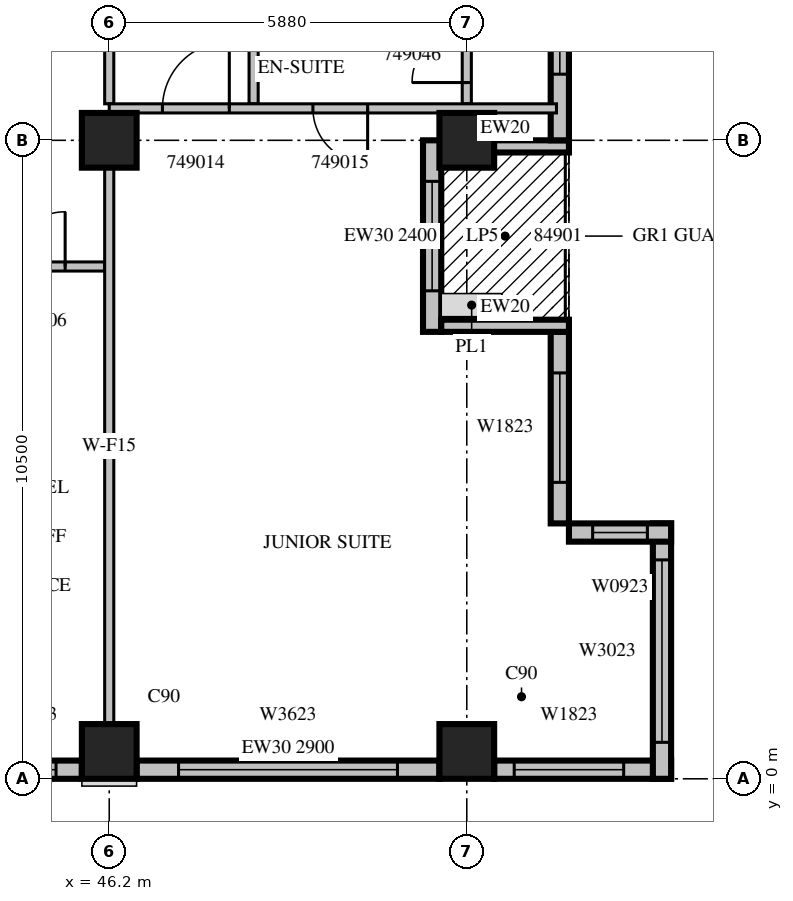
"""IFC4 building model, lengths in metres.
Left out: names, types, materials, properties, quantities, classifications, styles, units other than length and angle.
Written with IfcOpenShell. Run it as: python <this file> out.ifc"""

import sys

from ifc_helpers import new_model, si_unit, direction, frame, frame_2d, origin, origin_2d, place, context, subcontext, project, spatial, rectangle, extrude, source, transform, mapped, element, fill, save


model = new_model("IFC4")
c1 = context("Model", 3, precision=1e-05, world=origin(), true_north=direction((0.0, 1.0)))
c2 = subcontext(c1, "Body", "Model", "MODEL_VIEW")
j1 = project(units=[si_unit("LENGTHUNIT", "METRE"), si_unit("PLANEANGLEUNIT", "RADIAN")], contexts=[c1])
p1 = place(None, origin())
s1 = spatial("IfcSite", under=j1, at=p1, CompositionType="ELEMENT")
p2 = place(p1, origin())
s2 = spatial("IfcBuilding", under=s1, at=p2, CompositionType="ELEMENT")
p3 = place(p2, frame((0.0, 0.0, 219.6)))
s3 = spatial("IfcBuildingStorey", under=s2, at=p3, CompositionType="ELEMENT", Elevation=219.6)
m1 = source(origin(), c2, "Body", "SweptSolid", [
    extrude(rectangle(XDim=0.9, YDim=0.9, at=origin_2d()), origin(), (0.0, 0.0, 1.0), 3.8),
])
for number, where, z_axis, x_axis in (
    (1, (46.2, 0.45, 0.0), (0.0, 0.0, 1.0), (1.0, 0.0, 0.0)),
    (2, (52.08, 0.45, 0.0), (0.0, 0.0, 1.0), (1.0, 0.0, 0.0)),
    (3, (46.2, 10.5, 0.0), (0.0, 0.0, 1.0), (1.0, 0.0, 0.0)),
    (4, (52.08, 10.5, 0.0), (0.0, 0.0, 1.0), (1.0, 0.0, 0.0)),
):
    element("IfcColumn", number, at=place(p3, frame(where, z_axis=z_axis, x_axis=x_axis)), inside=s3, PredefinedType="COLUMN", context=c2, shape_type="MappedRepresentation", body=[
        mapped(m1, transform((0.0, 0.0, 0.0), scale=1.0)),
    ])
m2 = source(origin(), c2, "Body", "SweptSolid", [
    extrude(rectangle(XDim=1.75, YDim=0.3, at=frame_2d((0.875, 0.0))), origin(), (0.0, 0.0, 1.0), 3.4),
])
p4 = place(p3, frame((44.0, 0.15, 0.0), z_axis=(0.0, 0.0, 1.0), x_axis=(1.0, 0.0, 0.0)))
e5 = element("IfcWall", 5, at=p4, inside=s3, PredefinedType="STANDARD", context=c2, shape_type="MappedRepresentation", body=[
    mapped(m2, transform((0.0, 0.0, 0.0), scale=1.0)),
])
m3 = source(origin(), c2, "Body", "SweptSolid", [
    extrude(rectangle(XDim=0.9, YDim=2.3, at=frame_2d((0.45, 1.15))), frame((0.0, 0.16, 0.0), z_axis=(0.0, -1.0, 0.0), x_axis=(1.0, 0.0, 0.0)), (0.0, 0.0, 1.0), 0.32),
])
p5 = place(p4, frame((0.425, 0.0, 0.6)))
e6 = element("IfcOpeningElement", 6, at=p5, cuts=e5, PredefinedType="OPENING", context=c2, shape_type="MappedRepresentation", body=[
    mapped(m3, transform((0.0, 0.0, 0.0), scale=1.0)),
])
m4 = source(origin(), c2, "Body", "SweptSolid", [
    extrude(rectangle(XDim=4.98, YDim=0.3, at=frame_2d((2.49, 0.0))), origin(), (0.0, 0.0, 1.0), 2.9),
])
p6 = place(p3, frame((46.65, 0.15, 0.0), z_axis=(0.0, 0.0, 1.0), x_axis=(1.0, 0.0, 0.0)))
e7 = element("IfcWall", 7, at=p6, inside=s3, PredefinedType="STANDARD", context=c2, shape_type="MappedRepresentation", body=[
    mapped(m4, transform((0.0, 0.0, 0.0), scale=1.0)),
])
m5 = source(origin(), c2, "Body", "SweptSolid", [
    extrude(rectangle(XDim=3.6, YDim=2.3, at=frame_2d((1.8, 1.15))), frame((0.0, 0.16, 0.0), z_axis=(0.0, -1.0, 0.0), x_axis=(1.0, 0.0, 0.0)), (0.0, 0.0, 1.0), 0.32),
])
p7 = place(p6, frame((0.69, 0.0, 0.6)))
e8 = element("IfcOpeningElement", 8, at=p7, cuts=e7, PredefinedType="OPENING", context=c2, shape_type="MappedRepresentation", body=[
    mapped(m5, transform((0.0, 0.0, 0.0), scale=1.0)),
])
m6 = source(origin(), c2, "Body", "SweptSolid", [
    extrude(rectangle(XDim=2.91, YDim=0.3, at=frame_2d((1.455, 0.0))), origin(), (0.0, 0.0, 1.0), 3.4),
])
p8 = place(p3, frame((52.53, 0.15, 0.0), z_axis=(0.0, 0.0, 1.0), x_axis=(1.0, 0.0, 0.0)))
e9 = element("IfcWall", 9, at=p8, inside=s3, PredefinedType="STANDARD", context=c2, shape_type="MappedRepresentation", body=[
    mapped(m6, transform((0.0, 0.0, 0.0), scale=1.0)),
])
m7 = source(origin(), c2, "Body", "SweptSolid", [
    extrude(rectangle(XDim=1.8, YDim=2.3, at=frame_2d((0.9, 1.15))), frame((0.0, 0.16, 0.0), z_axis=(0.0, -1.0, 0.0), x_axis=(1.0, 0.0, 0.0)), (0.0, 0.0, 1.0), 0.32),
])
p9 = place(p8, frame((0.33, 0.0, 0.6)))
e10 = element("IfcOpeningElement", 10, at=p9, cuts=e9, PredefinedType="OPENING", context=c2, shape_type="MappedRepresentation", body=[
    mapped(m7, transform((0.0, 0.0, 0.0), scale=1.0)),
])
m8 = source(origin(), c2, "Body", "SweptSolid", [
    extrude(rectangle(XDim=4.2, YDim=0.3, at=frame_2d((2.1, 0.0))), origin(), (0.0, 0.0, 1.0), 3.4),
])
p10 = place(p3, frame((55.29, 0.0, 0.0), z_axis=(0.0, 0.0, 1.0), x_axis=(0.0, 1.0, 0.0)))
e11 = element("IfcWall", 11, at=p10, inside=s3, PredefinedType="STANDARD", context=c2, shape_type="MappedRepresentation", body=[
    mapped(m8, transform((0.0, 0.0, 0.0), scale=1.0)),
])
m9 = source(origin(), c2, "Body", "SweptSolid", [
    extrude(rectangle(XDim=3.0, YDim=2.3, at=frame_2d((1.5, 1.15))), frame((0.0, 0.16, 0.0), z_axis=(0.0, -1.0, 0.0), x_axis=(1.0, 0.0, 0.0)), (0.0, 0.0, 1.0), 0.32),
])
p11 = place(p10, frame((0.6, 0.0, 0.6)))
e12 = element("IfcOpeningElement", 12, at=p11, cuts=e11, PredefinedType="OPENING", context=c2, shape_type="MappedRepresentation", body=[
    mapped(m9, transform((0.0, 0.0, 0.0), scale=1.0)),
])
m10 = source(origin(), c2, "Body", "SweptSolid", [
    extrude(rectangle(XDim=1.68, YDim=0.3, at=frame_2d((0.84, 0.0))), origin(), (0.0, 0.0, 1.0), 3.4),
])
p12 = place(p3, frame((55.44, 4.05, 0.0), z_axis=(0.0, 0.0, 1.0), x_axis=(-1.0, 0.0, 0.0)))
e13 = element("IfcWall", 13, at=p12, inside=s3, PredefinedType="STANDARD", context=c2, shape_type="MappedRepresentation", body=[
    mapped(m10, transform((0.0, 0.0, 0.0), scale=1.0)),
])
p13 = place(p12, frame((0.39, 0.0, 0.6)))
e14 = element("IfcOpeningElement", 14, at=p13, cuts=e13, PredefinedType="OPENING", context=c2, shape_type="MappedRepresentation", body=[
    mapped(m3, transform((0.0, 0.0, 0.0), scale=1.0)),
])
m11 = source(origin(), c2, "Body", "SweptSolid", [
    extrude(rectangle(XDim=3.15, YDim=0.3, at=frame_2d((1.575, 0.0))), origin(), (0.0, 0.0, 1.0), 3.4),
])
p14 = place(p3, frame((53.61, 4.2, 0.0), z_axis=(0.0, 0.0, 1.0), x_axis=(0.0, 1.0, 0.0)))
e15 = element("IfcWall", 15, at=p14, inside=s3, PredefinedType="STANDARD", context=c2, shape_type="MappedRepresentation", body=[
    mapped(m11, transform((0.0, 0.0, 0.0), scale=1.0)),
])
p15 = place(p14, frame((0.675, 0.0, 0.6)))
e16 = element("IfcOpeningElement", 16, at=p15, cuts=e15, PredefinedType="OPENING", context=c2, shape_type="MappedRepresentation", body=[
    mapped(m7, transform((0.0, 0.0, 0.0), scale=1.0)),
])
p16 = place(p3, frame((51.51, 7.35, 0.0), z_axis=(0.0, 0.0, 1.0), x_axis=(0.0, 1.0, 0.0)))
e17 = element("IfcWall", 17, at=p16, inside=s3, PredefinedType="STANDARD", context=c2, shape_type="SweptSolid", body=[
    extrude(rectangle(XDim=3.15, YDim=0.3, at=frame_2d((1.575, 0.0))), origin(), (0.0, 0.0, 1.0), 2.4),
])
m12 = source(origin(), c2, "Body", "SweptSolid", [
    extrude(rectangle(XDim=1.8, YDim=2.4, at=frame_2d((0.9, 1.2))), frame((0.0, 0.16, 0.0), z_axis=(0.0, -1.0, 0.0), x_axis=(1.0, 0.0, 0.0)), (0.0, 0.0, 1.0), 0.32),
])
p17 = place(p16, frame((0.675, 0.0, 0.0)))
e18 = element("IfcOpeningElement", 18, at=p17, cuts=e17, PredefinedType="OPENING", context=c2, shape_type="MappedRepresentation", body=[
    mapped(m12, transform((0.0, 0.0, 0.0), scale=1.0)),
])
m13 = source(origin(), c2, "Body", "SweptSolid", [
    extrude(rectangle(XDim=2.1, YDim=0.2, at=frame_2d((1.05, 0.0))), origin(), (0.0, 0.0, 1.0), 3.4),
])
for number, where, z_axis, x_axis in (
    (19, (53.76, 7.45, 0.0), (0.0, 0.0, 1.0), (-1.0, 0.0, 0.0)),
    (20, (53.76, 10.4, 0.0), (0.0, 0.0, 1.0), (-1.0, 0.0, 0.0)),
):
    element("IfcWall", number, at=place(p3, frame(where, z_axis=z_axis, x_axis=x_axis)), inside=s3, PredefinedType="STANDARD", context=c2, shape_type="MappedRepresentation", body=[
        mapped(m13, transform((0.0, 0.0, 0.0), scale=1.0)),
    ])
m14 = source(origin(), c2, "Body", "SweptSolid", [
    extrude(rectangle(XDim=6.75, YDim=0.3, at=frame_2d((3.375, 0.0))), origin(), (0.0, 0.0, 1.0), 3.4),
])
p18 = place(p3, frame((53.61, 10.5, 0.0), z_axis=(0.0, 0.0, 1.0), x_axis=(0.0, 1.0, 0.0)))
e21 = element("IfcWall", 21, at=p18, inside=s3, PredefinedType="STANDARD", context=c2, shape_type="MappedRepresentation", body=[
    mapped(m14, transform((0.0, 0.0, 0.0), scale=1.0)),
])
m15 = source(origin(), c2, "Body", "SweptSolid", [
    extrude(rectangle(XDim=1.2, YDim=2.3, at=frame_2d((0.6, 1.15))), frame((0.0, 0.16, 0.0), z_axis=(0.0, -1.0, 0.0), x_axis=(1.0, 0.0, 0.0)), (0.0, 0.0, 1.0), 0.32),
])
p19 = place(p18, frame((1.087, 0.0, 0.6)))
e22 = element("IfcOpeningElement", 22, at=p19, cuts=e21, PredefinedType="OPENING", context=c2, shape_type="MappedRepresentation", body=[
    mapped(m15, transform((0.0, 0.0, 0.0), scale=1.0)),
])
p20 = place(p18, frame((4.606, 0.0, 0.6)))
e23 = element("IfcOpeningElement", 23, at=p20, cuts=e21, PredefinedType="OPENING", context=c2, shape_type="MappedRepresentation", body=[
    mapped(m15, transform((0.0, 0.0, 0.0), scale=1.0)),
])
m16 = source(origin(), c2, "Body", "SweptSolid", [
    extrude(rectangle(XDim=2.2, YDim=0.15, at=frame_2d((1.1, 0.0))), origin(), (0.0, 0.0, 1.0), 3.4),
])
p21 = place(p3, frame((46.125, 8.425, 0.0), z_axis=(0.0, 0.0, 1.0), x_axis=(-1.0, 0.0, 0.0)))
e24 = element("IfcWall", 24, at=p21, inside=s3, PredefinedType="PARTITIONING", context=c2, shape_type="MappedRepresentation", body=[
    mapped(m16, transform((0.0, 0.0, 0.0), scale=1.0)),
])
m17 = source(origin(), c2, "Body", "SweptSolid", [
    extrude(rectangle(XDim=0.9, YDim=2.1, at=frame_2d((0.45, 1.05))), frame((0.0, 0.085, 0.0), z_axis=(0.0, -1.0, 0.0), x_axis=(1.0, 0.0, 0.0)), (0.0, 0.0, 1.0), 0.17),
])
p22 = place(p21, frame((0.65, 0.0, 0.0)))
e25 = element("IfcOpeningElement", 25, at=p22, cuts=e24, PredefinedType="OPENING", context=c2, shape_type="MappedRepresentation", body=[
    mapped(m17, transform((0.0, 0.0, 0.0), scale=1.0)),
])
m18 = source(origin(), c2, "Body", "SweptSolid", [
    extrude(rectangle(XDim=3.6, YDim=0.15, at=frame_2d((1.8, 0.0))), origin(), (0.0, 0.0, 1.0), 3.4),
])
p23 = place(p3, frame((48.574, 11.1, 0.0), z_axis=(0.0, 0.0, 1.0), x_axis=(0.0, 1.0, 0.0)))
e26 = element("IfcWall", 26, at=p23, inside=s3, PredefinedType="PARTITIONING", context=c2, shape_type="MappedRepresentation", body=[
    mapped(m18, transform((0.0, 0.0, 0.0), scale=1.0)),
])
p24 = place(p3, frame((52.08, 11.1, 0.0), z_axis=(0.0, 0.0, 1.0), x_axis=(0.0, 1.0, 0.0)))
e27 = element("IfcWall", 27, at=p24, inside=s3, PredefinedType="PARTITIONING", context=c2, shape_type="MappedRepresentation", body=[
    mapped(m18, transform((0.0, 0.0, 0.0), scale=1.0)),
])
p25 = place(p24, frame((1.35, 0.0, 0.0)))
e28 = element("IfcOpeningElement", 28, at=p25, cuts=e27, PredefinedType="OPENING", context=c2, shape_type="MappedRepresentation", body=[
    mapped(m17, transform((0.0, 0.0, 0.0), scale=1.0)),
])
p26 = place(p24, frame((2.35, 0.0, 0.0)))
e29 = element("IfcOpeningElement", 29, at=p26, cuts=e27, PredefinedType="OPENING", context=c2, shape_type="MappedRepresentation", body=[
    mapped(m17, transform((0.0, 0.0, 0.0), scale=1.0)),
])
p27 = place(p24, frame((0.35, 0.0, 0.0)))
e30 = element("IfcOpeningElement", 30, at=p27, cuts=e27, PredefinedType="OPENING", context=c2, shape_type="MappedRepresentation", body=[
    mapped(m17, transform((0.0, 0.0, 0.0), scale=1.0)),
])
m19 = source(origin(), c2, "Body", "SweptSolid", [
    extrude(rectangle(XDim=9.152, YDim=0.15, at=frame_2d((4.576, 0.0))), origin(), (0.0, 0.0, 1.0), 3.4),
])
p28 = place(p3, frame((46.2, 0.899, 0.0), z_axis=(0.0, 0.0, 1.0), x_axis=(0.0, 1.0, 0.0)))
e31 = element("IfcWall", 31, at=p28, inside=s3, PredefinedType="PARTITIONING", context=c2, shape_type="MappedRepresentation", body=[
    mapped(m19, transform((0.0, 0.0, 0.0), scale=1.0)),
])
p29 = place(p3, frame((46.2, 11.1, 0.0), z_axis=(0.0, 0.0, 1.0), x_axis=(0.0, 1.0, 0.0)))
e32 = element("IfcWall", 32, at=p29, inside=s3, PredefinedType="PARTITIONING", context=c2, shape_type="MappedRepresentation", body=[
    mapped(m18, transform((0.0, 0.0, 0.0), scale=1.0)),
])
m20 = source(origin(), c2, "Body", "SweptSolid", [
    extrude(rectangle(XDim=7.355, YDim=0.15, at=frame_2d((3.678, 0.0))), origin(), (0.0, 0.0, 1.0), 3.4),
])
p30 = place(p3, frame((53.555, 11.025, 0.0), z_axis=(0.0, 0.0, 1.0), x_axis=(-1.0, 0.0, 0.0)))
e33 = element("IfcWall", 33, at=p30, inside=s3, PredefinedType="PARTITIONING", context=c2, shape_type="MappedRepresentation", body=[
    mapped(m20, transform((0.0, 0.0, 0.0), scale=1.0)),
])
m21 = source(origin(), c2, "Body", "SweptSolid", [
    extrude(rectangle(XDim=1.1, YDim=2.1, at=frame_2d((0.55, 1.05))), frame((0.0, 0.085, 0.0), z_axis=(0.0, -1.0, 0.0), x_axis=(1.0, 0.0, 0.0)), (0.0, 0.0, 1.0), 0.17),
])
p31 = place(p30, frame((5.38, 0.0, 0.0)))
e34 = element("IfcOpeningElement", 34, at=p31, cuts=e33, PredefinedType="OPENING", context=c2, shape_type="MappedRepresentation", body=[
    mapped(m21, transform((0.0, 0.0, 0.0), scale=1.0)),
])
p32 = place(p30, frame((3.106, 0.0, 0.0)))
e35 = element("IfcOpeningElement", 35, at=p32, cuts=e33, PredefinedType="OPENING", context=c2, shape_type="MappedRepresentation", body=[
    mapped(m17, transform((0.0, 0.0, 0.0), scale=1.0)),
])
m22 = source(origin(), c2, "Body", "SweptSolid", [
    extrude(rectangle(XDim=0.9, YDim=2.3, at=frame_2d((0.45, 1.15))), frame((0.0, 0.03, 0.0), z_axis=(0.0, -1.0, 0.0), x_axis=(1.0, 0.0, 0.0)), (0.0, 0.0, 1.0), 0.06),
])
p33 = place(p5, origin())
e36 = element("IfcWindow", 36, at=p33, inside=s3, PartitioningType="SINGLE_PANEL", PredefinedType="WINDOW", context=c2, shape_type="MappedRepresentation", body=[
    mapped(m22, transform((0.0, 0.0, 0.0), scale=1.0)),
])
fill(e6, e36)
m23 = source(origin(), c2, "Body", "SweptSolid", [
    extrude(rectangle(XDim=3.6, YDim=2.3, at=frame_2d((1.8, 1.15))), frame((0.0, 0.03, 0.0), z_axis=(0.0, -1.0, 0.0), x_axis=(1.0, 0.0, 0.0)), (0.0, 0.0, 1.0), 0.06),
])
p34 = place(p7, origin())
e37 = element("IfcWindow", 37, at=p34, inside=s3, PartitioningType="SINGLE_PANEL", PredefinedType="WINDOW", context=c2, shape_type="MappedRepresentation", body=[
    mapped(m23, transform((0.0, 0.0, 0.0), scale=1.0)),
])
fill(e8, e37)
m24 = source(origin(), c2, "Body", "SweptSolid", [
    extrude(rectangle(XDim=1.8, YDim=2.3, at=frame_2d((0.9, 1.15))), frame((0.0, 0.03, 0.0), z_axis=(0.0, -1.0, 0.0), x_axis=(1.0, 0.0, 0.0)), (0.0, 0.0, 1.0), 0.06),
])
p35 = place(p9, origin())
e38 = element("IfcWindow", 38, at=p35, inside=s3, PartitioningType="SINGLE_PANEL", PredefinedType="WINDOW", context=c2, shape_type="MappedRepresentation", body=[
    mapped(m24, transform((0.0, 0.0, 0.0), scale=1.0)),
])
fill(e10, e38)
m25 = source(origin(), c2, "Body", "SweptSolid", [
    extrude(rectangle(XDim=3.0, YDim=2.3, at=frame_2d((1.5, 1.15))), frame((0.0, 0.03, 0.0), z_axis=(0.0, -1.0, 0.0), x_axis=(1.0, 0.0, 0.0)), (0.0, 0.0, 1.0), 0.06),
])
p36 = place(p11, origin())
e39 = element("IfcWindow", 39, at=p36, inside=s3, PartitioningType="SINGLE_PANEL", PredefinedType="WINDOW", context=c2, shape_type="MappedRepresentation", body=[
    mapped(m25, transform((0.0, 0.0, 0.0), scale=1.0)),
])
fill(e12, e39)
p37 = place(p13, origin())
e40 = element("IfcWindow", 40, at=p37, inside=s3, PartitioningType="SINGLE_PANEL", PredefinedType="WINDOW", context=c2, shape_type="MappedRepresentation", body=[
    mapped(m22, transform((0.0, 0.0, 0.0), scale=1.0)),
])
fill(e14, e40)
p38 = place(p15, origin())
e41 = element("IfcWindow", 41, at=p38, inside=s3, PartitioningType="SINGLE_PANEL", PredefinedType="WINDOW", context=c2, shape_type="MappedRepresentation", body=[
    mapped(m24, transform((0.0, 0.0, 0.0), scale=1.0)),
])
fill(e16, e41)
m26 = source(origin(), c2, "Body", "SweptSolid", [
    extrude(rectangle(XDim=1.8, YDim=2.4, at=frame_2d((0.9, 1.2))), frame((0.0, 0.025, 0.0), z_axis=(0.0, -1.0, 0.0), x_axis=(1.0, 0.0, 0.0)), (0.0, 0.0, 1.0), 0.05),
])
p39 = place(p17, origin())
e42 = element("IfcDoor", 42, at=p39, inside=s3, OperationType="SLIDING_TO_LEFT", PredefinedType="DOOR", context=c2, shape_type="MappedRepresentation", body=[
    mapped(m26, transform((0.0, 0.0, 0.0), scale=1.0)),
])
fill(e18, e42)
m27 = source(origin(), c2, "Body", "SweptSolid", [
    extrude(rectangle(XDim=1.2, YDim=2.3, at=frame_2d((0.6, 1.15))), frame((0.0, 0.03, 0.0), z_axis=(0.0, -1.0, 0.0), x_axis=(1.0, 0.0, 0.0)), (0.0, 0.0, 1.0), 0.06),
])
p40 = place(p19, origin())
e43 = element("IfcWindow", 43, at=p40, inside=s3, PartitioningType="SINGLE_PANEL", PredefinedType="WINDOW", context=c2, shape_type="MappedRepresentation", body=[
    mapped(m27, transform((0.0, 0.0, 0.0), scale=1.0)),
])
fill(e22, e43)
m28 = source(origin(), c2, "Body", "SweptSolid", [
    extrude(rectangle(XDim=0.9, YDim=2.1, at=frame_2d((0.45, 1.05))), frame((0.0, 0.025, 0.0), z_axis=(0.0, -1.0, 0.0), x_axis=(1.0, 0.0, 0.0)), (0.0, 0.0, 1.0), 0.05),
])
p41 = place(p22, origin())
e44 = element("IfcDoor", 44, at=p41, inside=s3, OperationType="SINGLE_SWING_RIGHT", PredefinedType="DOOR", context=c2, shape_type="MappedRepresentation", body=[
    mapped(m28, transform((0.0, 0.0, 0.0), scale=1.0)),
])
fill(e25, e44)
m29 = source(origin(), c2, "Body", "SweptSolid", [
    extrude(rectangle(XDim=1.1, YDim=2.1, at=frame_2d((0.55, 1.05))), frame((0.0, 0.025, 0.0), z_axis=(0.0, -1.0, 0.0), x_axis=(1.0, 0.0, 0.0)), (0.0, 0.0, 1.0), 0.05),
])
p42 = place(p31, origin())
e45 = element("IfcDoor", 45, at=p42, inside=s3, OperationType="SINGLE_SWING_RIGHT", PredefinedType="DOOR", context=c2, shape_type="MappedRepresentation", body=[
    mapped(m29, transform((0.0, 0.0, 0.0), scale=1.0)),
])
fill(e34, e45)
p43 = place(p32, origin())
e46 = element("IfcDoor", 46, at=p43, inside=s3, OperationType="SINGLE_SWING_LEFT", PredefinedType="DOOR", context=c2, shape_type="MappedRepresentation", body=[
    mapped(m28, transform((0.0, 0.0, 0.0), scale=1.0)),
])
fill(e35, e46)
p44 = place(p27, origin())
e47 = element("IfcDoor", 47, at=p44, inside=s3, OperationType="SINGLE_SWING_LEFT", PredefinedType="DOOR", context=c2, shape_type="MappedRepresentation", body=[
    mapped(m28, transform((0.0, 0.0, 0.0), scale=1.0)),
])
fill(e30, e47)
save(model, sys.argv[1])
